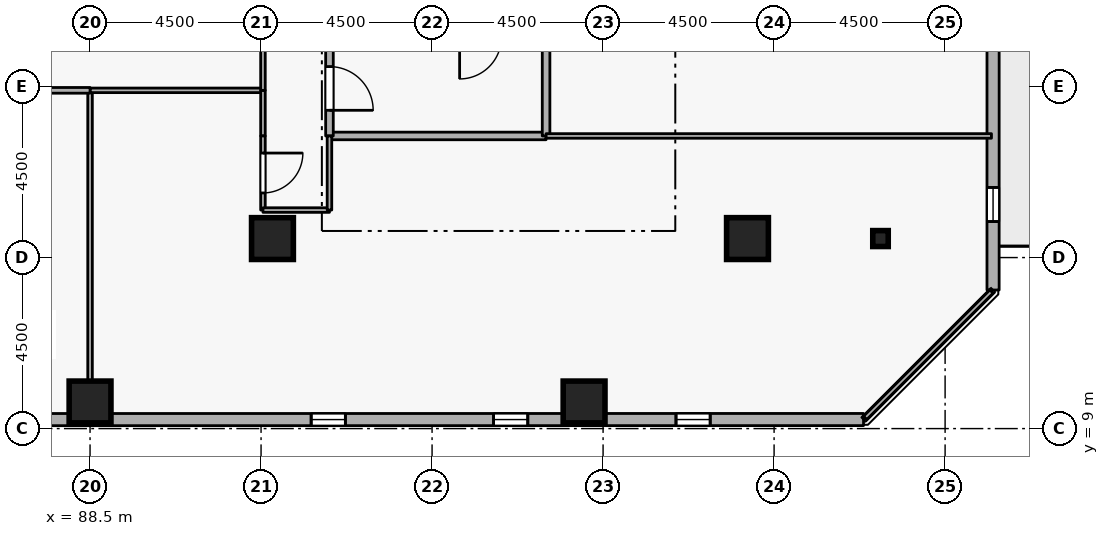
"""IFC4 building model, lengths in metres.
Left out: names, types, materials, properties, quantities, classifications, styles, units other than length and angle.
Written with IfcOpenShell. Run it as: python <this file> out.ifc"""

import sys

from ifc_helpers import new_model, si_unit, direction, frame, frame_2d, origin, origin_2d, place, context, subcontext, project, spatial, rectangle, i_section, extrude, element, fill, save


model = new_model("IFC4")
c1 = context("Model", 3, precision=1e-05, world=origin(), true_north=direction((0.0, 1.0)))
c2 = subcontext(c1, "Body", "Model", "MODEL_VIEW")
j1 = project(units=[si_unit("LENGTHUNIT", "METRE"), si_unit("PLANEANGLEUNIT", "RADIAN")], contexts=[c1])
p1 = place(None, origin())
s1 = spatial("IfcSite", under=j1, at=p1, CompositionType="ELEMENT")
p2 = place(p1, origin())
s2 = spatial("IfcBuilding", under=s1, at=p2, CompositionType="ELEMENT")
p3 = place(p2, frame((0.0, 0.0, 159.9)))
s3 = spatial("IfcBuildingStorey", under=s2, at=p3, CompositionType="ELEMENT", Elevation=159.9)
for number, where, z_axis, x_axis in (
    (1, (105.8, 14.0, 0.0), (0.0, 0.0, 1.0), (1.0, 0.0, 0.0)),
    (2, (101.5, 9.7, 0.0), (0.0, 0.0, 1.0), (1.0, 0.0, 0.0)),
    (3, (88.5, 9.7, 0.0), (0.0, 0.0, 1.0), (1.0, 0.0, 0.0)),
    (4, (93.3, 14.0, 0.0), (0.0, 0.0, 1.0), (1.0, 0.0, 0.0)),
):
    element("IfcColumn", number, at=place(p3, frame(where, z_axis=z_axis, x_axis=x_axis)), inside=s3, PredefinedType="COLUMN", context=c2, shape_type="SweptSolid", body=[
        extrude(rectangle(XDim=1.1, YDim=1.1, at=origin_2d()), origin(), (0.0, 0.0, 1.0), 3.6),
    ])
p4 = place(p3, frame((109.3, 14.0, 0.0), z_axis=(0.0, 0.0, 1.0), x_axis=(1.0, 0.0, 0.0)))
e5 = element("IfcColumn", 5, at=p4, inside=s3, PredefinedType="COLUMN", context=c2, shape_type="SweptSolid", body=[
    extrude(i_section(OverallWidth=0.407, OverallDepth=0.419, WebThickness=0.031, FlangeThickness=0.049, FilletRadius=0.015, at=origin_2d()), origin(), (0.0, 0.0, 1.0), 3.6),
])
p5 = place(p3, frame((73.319, 9.235, 0.0), z_axis=(0.0, 0.0, 1.0), x_axis=(0.999999997144, 7.5574884e-05, 0.0)))
e6 = element("IfcWall", 6, at=p5, inside=s3, PredefinedType="STANDARD", context=c2, shape_type="SweptSolid", body=[
    extrude(rectangle(XDim=35.535, YDim=0.32, at=frame_2d((17.768, 0.0))), origin(), (0.0, 0.0, 1.0), 2.7),
])
p6 = place(p5, frame((6.6, 0.0, 0.72)))
e7 = element("IfcOpeningElement", 7, at=p6, cuts=e6, PredefinedType="OPENING", context=c2, shape_type="SweptSolid", body=[
    extrude(rectangle(XDim=0.9, YDim=1.75, at=frame_2d((0.45, 0.875))), frame((0.0, 0.17, 0.0), z_axis=(0.0, -1.0, 0.0), x_axis=(1.0, 0.0, 0.0)), (0.0, 0.0, 1.0), 0.34),
])
p7 = place(p5, frame((11.4, 0.0, 0.72)))
e8 = element("IfcOpeningElement", 8, at=p7, cuts=e6, PredefinedType="OPENING", context=c2, shape_type="SweptSolid", body=[
    extrude(rectangle(XDim=0.9, YDim=1.75, at=frame_2d((0.45, 0.875))), frame((0.0, 0.17, 0.0), z_axis=(0.0, -1.0, 0.0), x_axis=(1.0, 0.0, 0.0)), (0.0, 0.0, 1.0), 0.34),
])
p8 = place(p5, frame((21.0, 0.0, 0.72)))
e9 = element("IfcOpeningElement", 9, at=p8, cuts=e6, PredefinedType="OPENING", context=c2, shape_type="SweptSolid", body=[
    extrude(rectangle(XDim=0.9, YDim=1.75, at=frame_2d((0.45, 0.875))), frame((0.0, 0.17, 0.0), z_axis=(0.0, -1.0, 0.0), x_axis=(1.0, 0.0, 0.0)), (0.0, 0.0, 1.0), 0.34),
])
p9 = place(p5, frame((25.8, 0.0, 0.72)))
e10 = element("IfcOpeningElement", 10, at=p9, cuts=e6, PredefinedType="OPENING", context=c2, shape_type="SweptSolid", body=[
    extrude(rectangle(XDim=0.9, YDim=1.75, at=frame_2d((0.45, 0.875))), frame((0.0, 0.17, 0.0), z_axis=(0.0, -1.0, 0.0), x_axis=(1.0, 0.0, 0.0)), (0.0, 0.0, 1.0), 0.34),
])
p10 = place(p5, frame((30.6, 0.0, 0.72)))
e11 = element("IfcOpeningElement", 11, at=p10, cuts=e6, PredefinedType="OPENING", context=c2, shape_type="SweptSolid", body=[
    extrude(rectangle(XDim=0.9, YDim=1.75, at=frame_2d((0.45, 0.875))), frame((0.0, 0.17, 0.0), z_axis=(0.0, -1.0, 0.0), x_axis=(1.0, 0.0, 0.0)), (0.0, 0.0, 1.0), 0.34),
])
p11 = place(p3, frame((112.262, 12.646, 0.0), z_axis=(0.0, 0.0, 1.0), x_axis=(7.5574884e-05, 0.999999997144, 0.0)))
e12 = element("IfcWall", 12, at=p11, inside=s3, PredefinedType="STANDARD", context=c2, shape_type="SweptSolid", body=[
    extrude(rectangle(XDim=35.535, YDim=0.32, at=frame_2d((17.768, 0.0))), origin(), (0.0, 0.0, 1.0), 2.7),
])
p12 = place(p11, frame((22.718, 0.0, 0.0)))
e13 = element("IfcOpeningElement", 13, at=p12, cuts=e12, PredefinedType="OPENING", context=c2, shape_type="SweptSolid", body=[
    extrude(rectangle(XDim=1.0, YDim=2.08, at=frame_2d((0.5, 1.04))), frame((0.0, 0.17, 0.0), z_axis=(0.0, -1.0, 0.0), x_axis=(1.0, 0.0, 0.0)), (0.0, 0.0, 1.0), 0.34),
])
p13 = place(p11, frame((1.8, 0.0, 0.72)))
e14 = element("IfcOpeningElement", 14, at=p13, cuts=e12, PredefinedType="OPENING", context=c2, shape_type="SweptSolid", body=[
    extrude(rectangle(XDim=0.9, YDim=1.75, at=frame_2d((0.45, 0.875))), frame((0.0, 0.17, 0.0), z_axis=(0.0, -1.0, 0.0), x_axis=(1.0, 0.0, 0.0)), (0.0, 0.0, 1.0), 0.34),
])
p14 = place(p11, frame((6.6, 0.0, 0.72)))
e15 = element("IfcOpeningElement", 15, at=p14, cuts=e12, PredefinedType="OPENING", context=c2, shape_type="SweptSolid", body=[
    extrude(rectangle(XDim=0.9, YDim=1.75, at=frame_2d((0.45, 0.875))), frame((0.0, 0.17, 0.0), z_axis=(0.0, -1.0, 0.0), x_axis=(1.0, 0.0, 0.0)), (0.0, 0.0, 1.0), 0.34),
])
p15 = place(p11, frame((11.4, 0.0, 0.72)))
e16 = element("IfcOpeningElement", 16, at=p15, cuts=e12, PredefinedType="OPENING", context=c2, shape_type="SweptSolid", body=[
    extrude(rectangle(XDim=0.9, YDim=1.75, at=frame_2d((0.45, 0.875))), frame((0.0, 0.17, 0.0), z_axis=(0.0, -1.0, 0.0), x_axis=(1.0, 0.0, 0.0)), (0.0, 0.0, 1.0), 0.34),
])
p16 = place(p11, frame((16.2, 0.0, 0.72)))
e17 = element("IfcOpeningElement", 17, at=p16, cuts=e12, PredefinedType="OPENING", context=c2, shape_type="SweptSolid", body=[
    extrude(rectangle(XDim=0.9, YDim=1.75, at=frame_2d((0.45, 0.875))), frame((0.0, 0.17, 0.0), z_axis=(0.0, -1.0, 0.0), x_axis=(1.0, 0.0, 0.0)), (0.0, 0.0, 1.0), 0.34),
])
p17 = place(p11, frame((21.0, 0.0, 0.72)))
e18 = element("IfcOpeningElement", 18, at=p17, cuts=e12, PredefinedType="OPENING", context=c2, shape_type="SweptSolid", body=[
    extrude(rectangle(XDim=0.9, YDim=1.75, at=frame_2d((0.45, 0.875))), frame((0.0, 0.17, 0.0), z_axis=(0.0, -1.0, 0.0), x_axis=(1.0, 0.0, 0.0)), (0.0, 0.0, 1.0), 0.34),
])
p18 = place(p11, frame((25.8, 0.0, 0.72)))
e19 = element("IfcOpeningElement", 19, at=p18, cuts=e12, PredefinedType="OPENING", context=c2, shape_type="SweptSolid", body=[
    extrude(rectangle(XDim=0.9, YDim=1.75, at=frame_2d((0.45, 0.875))), frame((0.0, 0.17, 0.0), z_axis=(0.0, -1.0, 0.0), x_axis=(1.0, 0.0, 0.0)), (0.0, 0.0, 1.0), 0.34),
])
p19 = place(p11, frame((30.6, 0.0, 0.72)))
e20 = element("IfcOpeningElement", 20, at=p19, cuts=e12, PredefinedType="OPENING", context=c2, shape_type="SweptSolid", body=[
    extrude(rectangle(XDim=0.9, YDim=1.75, at=frame_2d((0.45, 0.875))), frame((0.0, 0.17, 0.0), z_axis=(0.0, -1.0, 0.0), x_axis=(1.0, 0.0, 0.0)), (0.0, 0.0, 1.0), 0.34),
])
p20 = place(p3, frame((94.8, 16.7, 0.0), z_axis=(0.0, 0.0, 1.0), x_axis=(1.0, 0.0, 0.0)))
e21 = element("IfcWall", 21, at=p20, inside=s3, PredefinedType="STANDARD", context=c2, shape_type="SweptSolid", body=[
    extrude(rectangle(XDim=5.7, YDim=0.2, at=frame_2d((2.85, 0.0))), origin(), (0.0, 0.0, 1.0), 3.34),
])
p21 = place(p3, frame((100.5, 16.7, 0.0), z_axis=(0.0, 0.0, 1.0), x_axis=(0.0, 1.0, 0.0)))
e22 = element("IfcWall", 22, at=p21, inside=s3, PredefinedType="STANDARD", context=c2, shape_type="SweptSolid", body=[
    extrude(rectangle(XDim=2.5, YDim=0.2, at=frame_2d((1.25, 0.0))), origin(), (0.0, 0.0, 1.0), 3.34),
])
p22 = place(p3, frame((94.8, 19.2, 0.0), z_axis=(0.0, 0.0, 1.0), x_axis=(0.0, -1.0, 0.0)))
e23 = element("IfcWall", 23, at=p22, inside=s3, PredefinedType="STANDARD", context=c2, shape_type="SweptSolid", body=[
    extrude(rectangle(XDim=2.5, YDim=0.2, at=frame_2d((1.25, 0.0))), origin(), (0.0, 0.0, 1.0), 3.34),
])
p23 = place(p22, frame((0.675, 0.0, 0.0)))
e24 = element("IfcOpeningElement", 24, at=p23, cuts=e23, PredefinedType="OPENING", context=c2, shape_type="SweptSolid", body=[
    extrude(rectangle(XDim=1.15, YDim=2.1, at=frame_2d((0.575, 1.05))), frame((0.0, 0.11, 0.0), z_axis=(0.0, -1.0, 0.0), x_axis=(1.0, 0.0, 0.0)), (0.0, 0.0, 1.0), 0.22),
])
p24 = place(p3, frame((88.5, 9.28, 0.0), z_axis=(0.0, 0.0, 1.0), x_axis=(0.0, 1.0, 0.0)))
e25 = element("IfcWall", 25, at=p24, inside=s3, PredefinedType="PARTITIONING", context=c2, shape_type="SweptSolid", body=[
    extrude(rectangle(XDim=8.62, YDim=0.12, at=frame_2d((4.31, 0.0))), origin(), (0.0, 0.0, 1.0), 2.878),
])
p25 = place(p3, frame((88.5, 17.9, 0.0), z_axis=(0.0, 0.0, 1.0), x_axis=(1.0, 0.0, 0.0)))
e26 = element("IfcWall", 26, at=p25, inside=s3, PredefinedType="PARTITIONING", context=c2, shape_type="SweptSolid", body=[
    extrude(rectangle(XDim=4.55, YDim=0.12, at=frame_2d((2.275, 0.0))), origin(), (0.0, 0.0, 1.0), 3.34),
])
p26 = place(p3, frame((93.05, 17.9, 0.0), z_axis=(0.0, 0.0, 1.0), x_axis=(0.0, -1.0, 0.0)))
e27 = element("IfcWall", 27, at=p26, inside=s3, PredefinedType="PARTITIONING", context=c2, shape_type="SweptSolid", body=[
    extrude(rectangle(XDim=1.2, YDim=0.12, at=frame_2d((0.6, 0.0))), origin(), (0.0, 0.0, 1.0), 3.34),
])
p27 = place(p3, frame((93.05, 16.7, 0.0), z_axis=(0.0, 0.0, 1.0), x_axis=(0.0, -1.0, 0.0)))
e28 = element("IfcWall", 28, at=p27, inside=s3, PredefinedType="PARTITIONING", context=c2, shape_type="SweptSolid", body=[
    extrude(rectangle(XDim=1.95, YDim=0.12, at=frame_2d((0.975, 0.0))), origin(), (0.0, 0.0, 1.0), 3.34),
])
p28 = place(p27, frame((0.45, 0.0, 0.0)))
e29 = element("IfcOpeningElement", 29, at=p28, cuts=e28, PredefinedType="OPENING", context=c2, shape_type="SweptSolid", body=[
    extrude(rectangle(XDim=1.05, YDim=2.1, at=frame_2d((0.525, 1.05))), frame((0.0, 0.07, 0.0), z_axis=(0.0, -1.0, 0.0), x_axis=(1.0, 0.0, 0.0)), (0.0, 0.0, 1.0), 0.14),
])
p29 = place(p3, frame((93.05, 14.75, 0.0), z_axis=(0.0, 0.0, 1.0), x_axis=(1.0, 0.0, 0.0)))
e30 = element("IfcWall", 30, at=p29, inside=s3, PredefinedType="PARTITIONING", context=c2, shape_type="SweptSolid", body=[
    extrude(rectangle(XDim=1.75, YDim=0.12, at=frame_2d((0.875, 0.0))), origin(), (0.0, 0.0, 1.0), 3.34),
])
p30 = place(p3, frame((94.8, 14.75, 0.0), z_axis=(0.0, 0.0, 1.0), x_axis=(0.0, 1.0, 0.0)))
e31 = element("IfcWall", 31, at=p30, inside=s3, PredefinedType="PARTITIONING", context=c2, shape_type="SweptSolid", body=[
    extrude(rectangle(XDim=1.95, YDim=0.12, at=frame_2d((0.975, 0.0))), origin(), (0.0, 0.0, 1.0), 3.34),
])
p31 = place(p3, frame((100.5, 16.7, 0.0), z_axis=(0.0, 0.0, 1.0), x_axis=(1.0, 0.0, 0.0)))
e32 = element("IfcWall", 32, at=p31, inside=s3, PredefinedType="PARTITIONING", context=c2, shape_type="SweptSolid", body=[
    extrude(rectangle(XDim=11.72, YDim=0.12, at=frame_2d((5.86, 0.0))), origin(), (0.0, 0.0, 1.0), 3.34),
])
p32 = place(p3, frame((112.22, 12.606, 0.0), z_axis=(0.0, 0.0, 1.0), x_axis=(-0.707106781187, -0.707106781187, 0.0)))
e33 = element("IfcWall", 33, at=p32, inside=s3, PredefinedType="PARTITIONING", context=c2, shape_type="SweptSolid", body=[
    extrude(rectangle(XDim=4.703, YDim=0.12, at=frame_2d((2.352, 0.0))), origin(), (0.0, 0.0, 1.0), 3.34),
])
p33 = place(p3, frame((83.95, 17.9, 0.0), z_axis=(0.0, 0.0, 1.0), x_axis=(1.0, 0.0, 0.0)))
e34 = element("IfcWall", 34, at=p33, inside=s3, PredefinedType="PARTITIONING", context=c2, shape_type="SweptSolid", body=[
    extrude(rectangle(XDim=4.55, YDim=0.15, at=frame_2d((2.275, 0.0))), origin(), (0.0, 0.0, 1.0), 3.34),
])
p34 = place(p3, frame((93.05, 22.4, 0.0), z_axis=(0.0, 0.0, 1.0), x_axis=(0.0, -1.0, 0.0)))
e35 = element("IfcWall", 35, at=p34, inside=s3, PredefinedType="PARTITIONING", context=c2, shape_type="SweptSolid", body=[
    extrude(rectangle(XDim=4.5, YDim=0.12, at=frame_2d((2.25, 0.0))), origin(), (0.0, 0.0, 1.0), 3.34),
])
p35 = place(p8, origin())
e36 = element("IfcWindow", 36, at=p35, inside=s3, PartitioningType="SINGLE_PANEL", PredefinedType="WINDOW", context=c2, shape_type="SweptSolid", body=[
    extrude(rectangle(XDim=0.9, YDim=1.75, at=frame_2d((0.45, 0.875))), frame((0.0, 0.03, 0.0), z_axis=(0.0, -1.0, 0.0), x_axis=(1.0, 0.0, 0.0)), (0.0, 0.0, 1.0), 0.06),
])
fill(e9, e36)
p36 = place(p9, origin())
e37 = element("IfcWindow", 37, at=p36, inside=s3, PartitioningType="SINGLE_PANEL", PredefinedType="WINDOW", context=c2, shape_type="SweptSolid", body=[
    extrude(rectangle(XDim=0.9, YDim=1.75, at=frame_2d((0.45, 0.875))), frame((0.0, 0.03, 0.0), z_axis=(0.0, -1.0, 0.0), x_axis=(1.0, 0.0, 0.0)), (0.0, 0.0, 1.0), 0.06),
])
fill(e10, e37)
p37 = place(p10, origin())
e38 = element("IfcWindow", 38, at=p37, inside=s3, PartitioningType="SINGLE_PANEL", PredefinedType="WINDOW", context=c2, shape_type="SweptSolid", body=[
    extrude(rectangle(XDim=0.9, YDim=1.75, at=frame_2d((0.45, 0.875))), frame((0.0, 0.03, 0.0), z_axis=(0.0, -1.0, 0.0), x_axis=(1.0, 0.0, 0.0)), (0.0, 0.0, 1.0), 0.06),
])
fill(e11, e38)
p38 = place(p13, origin())
e39 = element("IfcWindow", 39, at=p38, inside=s3, PartitioningType="SINGLE_PANEL", PredefinedType="WINDOW", context=c2, shape_type="SweptSolid", body=[
    extrude(rectangle(XDim=0.9, YDim=1.75, at=frame_2d((0.45, 0.875))), frame((0.0, 0.03, 0.0), z_axis=(0.0, -1.0, 0.0), x_axis=(1.0, 0.0, 0.0)), (0.0, 0.0, 1.0), 0.06),
])
fill(e14, e39)
p39 = place(p23, origin())
e40 = element("IfcDoor", 40, at=p39, inside=s3, OperationType="SINGLE_SWING_RIGHT", PredefinedType="DOOR", context=c2, shape_type="SweptSolid", body=[
    extrude(rectangle(XDim=1.15, YDim=2.1, at=frame_2d((0.575, 1.05))), frame((0.0, 0.025, 0.0), z_axis=(0.0, -1.0, 0.0), x_axis=(1.0, 0.0, 0.0)), (0.0, 0.0, 1.0), 0.05),
])
fill(e24, e40)
p40 = place(p28, origin())
e41 = element("IfcDoor", 41, at=p40, inside=s3, OperationType="SINGLE_SWING_LEFT", PredefinedType="DOOR", context=c2, shape_type="SweptSolid", body=[
    extrude(rectangle(XDim=1.05, YDim=2.1, at=frame_2d((0.525, 1.05))), frame((0.0, 0.025, 0.0), z_axis=(0.0, -1.0, 0.0), x_axis=(1.0, 0.0, 0.0)), (0.0, 0.0, 1.0), 0.05),
])
fill(e29, e41)
save(model, sys.argv[1])
